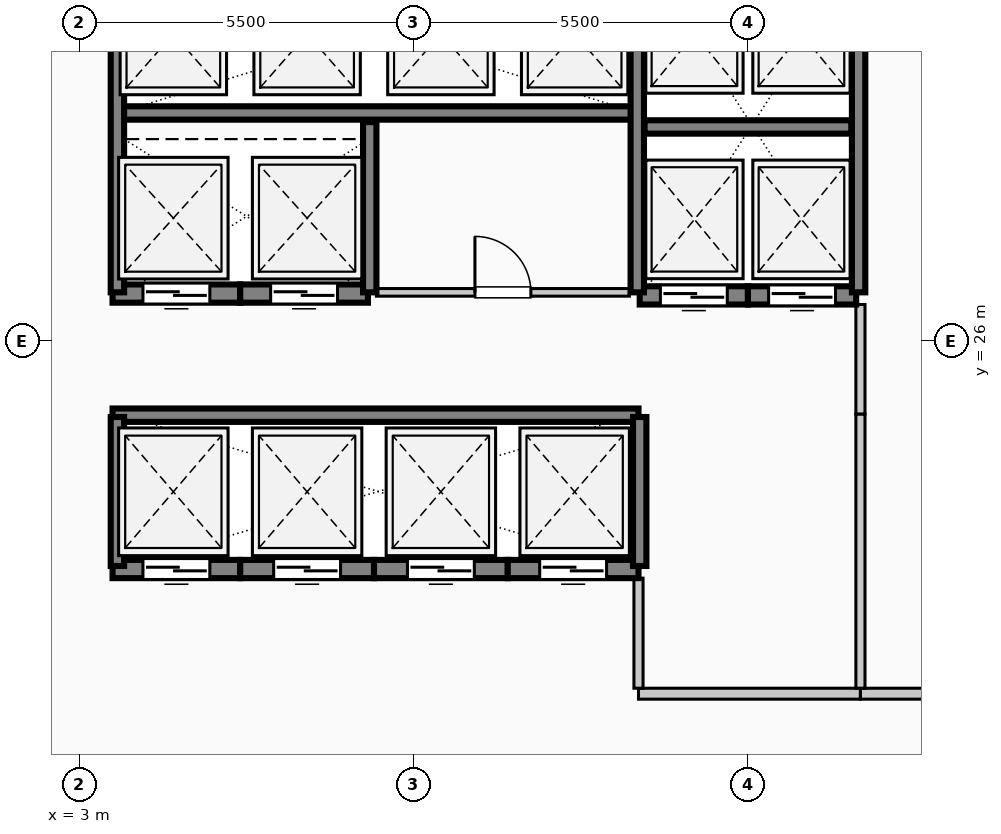
"""IFC4 building model, lengths in metres.
Left out: names, types, materials, properties, quantities, classifications, styles, units other than length and angle.
Written with IfcOpenShell. Run it as: python <this file> out.ifc"""

import sys

from ifc_helpers import new_model, si_unit, direction, frame, frame_2d, origin, place, context, subcontext, project, spatial, rectangle, extrude, element, fill, save


model = new_model("IFC4")
c1 = context("Model", 3, precision=1e-05, world=origin(), true_north=direction((0.0, 1.0)))
c2 = subcontext(c1, "Body", "Model", "MODEL_VIEW")
j1 = project(units=[si_unit("LENGTHUNIT", "METRE"), si_unit("PLANEANGLEUNIT", "RADIAN")], contexts=[c1])
p1 = place(None, origin())
s1 = spatial("IfcSite", under=j1, at=p1, CompositionType="ELEMENT")
p2 = place(p1, origin())
s2 = spatial("IfcBuilding", under=s1, at=p2, CompositionType="ELEMENT")
p3 = place(p2, origin())
s3 = spatial("IfcBuildingStorey", under=s2, at=p3, CompositionType="ELEMENT", Elevation=0.0)
p4 = place(p3, frame((5.65, 22.25, 0.0), z_axis=(0.0, 0.0, 1.0), x_axis=(-1.0, 0.0, 0.0)))
e1 = element("IfcWall", 1, at=p4, inside=s3, PredefinedType="SOLIDWALL", context=c2, shape_type="SweptSolid", body=[
    extrude(rectangle(XDim=2.1, YDim=0.3, at=frame_2d((1.05, 0.0))), origin(), (0.0, 0.0, 1.0), 5.4),
])
p5 = place(p4, frame((0.5, 0.0, 0.0)))
e2 = element("IfcOpeningElement", 2, at=p5, cuts=e1, PredefinedType="OPENING", context=c2, shape_type="SweptSolid", body=[
    extrude(rectangle(XDim=1.1, YDim=2.2, at=frame_2d((0.55, 1.1))), frame((0.0, 0.16, 0.0), z_axis=(0.0, -1.0, 0.0), x_axis=(1.0, 0.0, 0.0)), (0.0, 0.0, 1.0), 0.32),
])
p6 = place(p3, frame((7.85, 22.25, 0.0), z_axis=(0.0, 0.0, 1.0), x_axis=(-1.0, 0.0, 0.0)))
e3 = element("IfcWall", 3, at=p6, inside=s3, PredefinedType="SOLIDWALL", context=c2, shape_type="SweptSolid", body=[
    extrude(rectangle(XDim=2.2, YDim=0.3, at=frame_2d((1.1, 0.0))), origin(), (0.0, 0.0, 1.0), 5.4),
])
p7 = place(p6, frame((0.55, 0.0, 0.0)))
e4 = element("IfcOpeningElement", 4, at=p7, cuts=e3, PredefinedType="OPENING", context=c2, shape_type="SweptSolid", body=[
    extrude(rectangle(XDim=1.1, YDim=2.2, at=frame_2d((0.55, 1.1))), frame((0.0, 0.16, 0.0), z_axis=(0.0, -1.0, 0.0), x_axis=(1.0, 0.0, 0.0)), (0.0, 0.0, 1.0), 0.32),
])
p8 = place(p3, frame((10.05, 22.25, 0.0), z_axis=(0.0, 0.0, 1.0), x_axis=(-1.0, 0.0, 0.0)))
e5 = element("IfcWall", 5, at=p8, inside=s3, PredefinedType="SOLIDWALL", context=c2, shape_type="SweptSolid", body=[
    extrude(rectangle(XDim=2.2, YDim=0.3, at=frame_2d((1.1, 0.0))), origin(), (0.0, 0.0, 1.0), 5.4),
])
p9 = place(p8, frame((0.55, 0.0, 0.0)))
e6 = element("IfcOpeningElement", 6, at=p9, cuts=e5, PredefinedType="OPENING", context=c2, shape_type="SweptSolid", body=[
    extrude(rectangle(XDim=1.1, YDim=2.2, at=frame_2d((0.55, 1.1))), frame((0.0, 0.16, 0.0), z_axis=(0.0, -1.0, 0.0), x_axis=(1.0, 0.0, 0.0)), (0.0, 0.0, 1.0), 0.32),
])
p10 = place(p3, frame((12.2, 22.25, 0.0), z_axis=(0.0, 0.0, 1.0), x_axis=(-1.0, 0.0, 0.0)))
e7 = element("IfcWall", 7, at=p10, inside=s3, PredefinedType="SOLIDWALL", context=c2, shape_type="SweptSolid", body=[
    extrude(rectangle(XDim=2.15, YDim=0.3, at=frame_2d((1.075, 0.0))), origin(), (0.0, 0.0, 1.0), 5.4),
])
p11 = place(p10, frame((0.525, 0.0, 0.0)))
e8 = element("IfcOpeningElement", 8, at=p11, cuts=e7, PredefinedType="OPENING", context=c2, shape_type="SweptSolid", body=[
    extrude(rectangle(XDim=1.1, YDim=2.2, at=frame_2d((0.55, 1.1))), frame((0.0, 0.16, 0.0), z_axis=(0.0, -1.0, 0.0), x_axis=(1.0, 0.0, 0.0)), (0.0, 0.0, 1.0), 0.32),
])
p12 = place(p3, frame((14.0, 26.75, 0.0), z_axis=(0.0, 0.0, 1.0), x_axis=(-1.0, 0.0, 0.0)))
e9 = element("IfcWall", 9, at=p12, inside=s3, PredefinedType="SOLIDWALL", context=c2, shape_type="SweptSolid", body=[
    extrude(rectangle(XDim=1.78, YDim=0.3, at=frame_2d((0.89, 0.0))), origin(), (0.0, 0.0, 1.0), 5.4),
])
p13 = place(p12, frame((0.34, 0.0, 0.0)))
e10 = element("IfcOpeningElement", 10, at=p13, cuts=e9, PredefinedType="OPENING", context=c2, shape_type="SweptSolid", body=[
    extrude(rectangle(XDim=1.1, YDim=2.2, at=frame_2d((0.55, 1.1))), frame((0.0, 0.16, 0.0), z_axis=(0.0, -1.0, 0.0), x_axis=(1.0, 0.0, 0.0)), (0.0, 0.0, 1.0), 0.32),
])
p14 = place(p3, frame((15.78, 26.75, 0.0), z_axis=(0.0, 0.0, 1.0), x_axis=(-1.0, 0.0, 0.0)))
e11 = element("IfcWall", 11, at=p14, inside=s3, PredefinedType="SOLIDWALL", context=c2, shape_type="SweptSolid", body=[
    extrude(rectangle(XDim=1.78, YDim=0.3, at=frame_2d((0.89, 0.0))), origin(), (0.0, 0.0, 1.0), 5.4),
])
p15 = place(p14, frame((0.34, 0.0, 0.0)))
e12 = element("IfcOpeningElement", 12, at=p15, cuts=e11, PredefinedType="OPENING", context=c2, shape_type="SweptSolid", body=[
    extrude(rectangle(XDim=1.1, YDim=2.2, at=frame_2d((0.55, 1.1))), frame((0.0, 0.16, 0.0), z_axis=(0.0, -1.0, 0.0), x_axis=(1.0, 0.0, 0.0)), (0.0, 0.0, 1.0), 0.32),
])
p16 = place(p3, frame((5.65, 26.78, 0.0), z_axis=(0.0, 0.0, 1.0), x_axis=(-1.0, 0.0, 0.0)))
e13 = element("IfcWall", 13, at=p16, inside=s3, PredefinedType="SOLIDWALL", context=c2, shape_type="SweptSolid", body=[
    extrude(rectangle(XDim=2.1, YDim=0.3, at=frame_2d((1.05, 0.0))), origin(), (0.0, 0.0, 1.0), 5.4),
])
p17 = place(p16, frame((0.5, 0.0, 0.0)))
e14 = element("IfcOpeningElement", 14, at=p17, cuts=e13, PredefinedType="OPENING", context=c2, shape_type="SweptSolid", body=[
    extrude(rectangle(XDim=1.1, YDim=2.2, at=frame_2d((0.55, 1.1))), frame((0.0, 0.16, 0.0), z_axis=(0.0, -1.0, 0.0), x_axis=(1.0, 0.0, 0.0)), (0.0, 0.0, 1.0), 0.32),
])
p18 = place(p3, frame((7.75, 26.78, 0.0), z_axis=(0.0, 0.0, 1.0), x_axis=(-1.0, 0.0, 0.0)))
e15 = element("IfcWall", 15, at=p18, inside=s3, PredefinedType="SOLIDWALL", context=c2, shape_type="SweptSolid", body=[
    extrude(rectangle(XDim=2.1, YDim=0.3, at=frame_2d((1.05, 0.0))), origin(), (0.0, 0.0, 1.0), 5.4),
])
p19 = place(p18, frame((0.5, 0.0, 0.0)))
e16 = element("IfcOpeningElement", 16, at=p19, cuts=e15, PredefinedType="OPENING", context=c2, shape_type="SweptSolid", body=[
    extrude(rectangle(XDim=1.1, YDim=2.2, at=frame_2d((0.55, 1.1))), frame((0.0, 0.16, 0.0), z_axis=(0.0, -1.0, 0.0), x_axis=(1.0, 0.0, 0.0)), (0.0, 0.0, 1.0), 0.32),
])
p20 = place(p3, frame((3.55, 29.75, 0.0), z_axis=(0.0, 0.0, 1.0), x_axis=(1.0, 0.0, 0.0)))
e17 = element("IfcWall", 17, at=p20, inside=s3, PredefinedType="SOLIDWALL", context=c2, shape_type="SweptSolid", body=[
    extrude(rectangle(XDim=8.65, YDim=0.22, at=frame_2d((4.325, 0.0))), origin(), (0.0, 0.0, 1.0), 5.4),
])
p21 = place(p3, frame((3.63, 26.8, 0.0), z_axis=(0.0, 0.0, 1.0), x_axis=(0.0, 1.0, 0.0)))
e18 = element("IfcWall", 18, at=p21, inside=s3, PredefinedType="SOLIDWALL", context=c2, shape_type="SweptSolid", body=[
    extrude(rectangle(XDim=5.55, YDim=0.22, at=frame_2d((2.775, 0.0))), origin(), (0.0, 0.0, 1.0), 5.4),
])
p22 = place(p3, frame((7.78, 26.8, 0.0), z_axis=(0.0, 0.0, 1.0), x_axis=(0.0, 1.0, 0.0)))
e19 = element("IfcWall", 19, at=p22, inside=s3, PredefinedType="SOLIDWALL", context=c2, shape_type="SweptSolid", body=[
    extrude(rectangle(XDim=2.8, YDim=0.22, at=frame_2d((1.4, 0.0))), origin(), (0.0, 0.0, 1.0), 5.4),
])
for number, where, z_axis, x_axis in (
    (20, (12.18, 26.8, 0.0), (0.0, 0.0, 1.0), (0.0, 1.0, 0.0)),
    (21, (15.82, 26.8, 0.0), (0.0, 0.0, 1.0), (0.0, 1.0, 0.0)),
):
    element("IfcWall", number, at=place(p3, frame(where, z_axis=z_axis, x_axis=x_axis)), inside=s3, PredefinedType="SOLIDWALL", context=c2, shape_type="SweptSolid", body=[
        extrude(rectangle(XDim=5.45, YDim=0.22, at=frame_2d((2.725, 0.0))), origin(), (0.0, 0.0, 1.0), 5.4),
    ])
p23 = place(p3, frame((12.3, 29.52, 0.0), z_axis=(0.0, 0.0, 1.0), x_axis=(1.0, 0.0, 0.0)))
e22 = element("IfcWall", 22, at=p23, inside=s3, PredefinedType="SOLIDWALL", context=c2, shape_type="SweptSolid", body=[
    extrude(rectangle(XDim=3.4, YDim=0.22, at=frame_2d((1.7, 0.0))), origin(), (0.0, 0.0, 1.0), 5.4),
])
p24 = place(p3, frame((3.55, 24.78, 0.0), z_axis=(0.0, 0.0, 1.0), x_axis=(1.0, 0.0, 0.0)))
e23 = element("IfcWall", 23, at=p24, inside=s3, PredefinedType="SOLIDWALL", context=c2, shape_type="SweptSolid", body=[
    extrude(rectangle(XDim=8.65, YDim=0.22, at=frame_2d((4.325, 0.0))), origin(), (0.0, 0.0, 1.0), 5.4),
])
for number, where, z_axis, x_axis in (
    (24, (3.63, 22.3, 0.0), (0.0, 0.0, 1.0), (0.0, 1.0, 0.0)),
    (25, (12.22, 22.3, 0.0), (0.0, 0.0, 1.0), (0.0, 1.0, 0.0)),
):
    element("IfcWall", number, at=place(p3, frame(where, z_axis=z_axis, x_axis=x_axis)), inside=s3, PredefinedType="SOLIDWALL", context=c2, shape_type="SweptSolid", body=[
        extrude(rectangle(XDim=2.45, YDim=0.22, at=frame_2d((1.225, 0.0))), origin(), (0.0, 0.0, 1.0), 5.4),
    ])
p25 = place(p3, frame((12.2, 20.2, 0.0), z_axis=(0.0, 0.0, 1.0), x_axis=(1.0, 0.0, 0.0)))
e26 = element("IfcWall", 26, at=p25, inside=s3, PredefinedType="PARTITIONING", context=c2, shape_type="SweptSolid", body=[
    extrude(rectangle(XDim=3.65, YDim=0.18, at=frame_2d((1.825, 0.0))), origin(), (0.0, 0.0, 1.0), 5.0),
])
p26 = place(p3, frame((15.85, 20.2, 0.0), z_axis=(0.0, 0.0, 1.0), x_axis=(1.0, 0.0, 0.0)))
e27 = element("IfcWall", 27, at=p26, inside=s3, PredefinedType="PARTITIONING", context=c2, shape_type="SweptSolid", body=[
    extrude(rectangle(XDim=25.7, YDim=0.18, at=frame_2d((12.85, 0.0))), origin(), (0.0, 0.0, 1.0), 5.0),
])
p27 = place(p26, frame((11.115, 0.0, 0.0)))
e28 = element("IfcOpeningElement", 28, at=p27, cuts=e27, PredefinedType="OPENING", context=c2, shape_type="SweptSolid", body=[
    extrude(rectangle(XDim=0.95, YDim=2.15, at=frame_2d((0.475, 1.075))), frame((0.0, 0.1, 0.0), z_axis=(0.0, -1.0, 0.0), x_axis=(1.0, 0.0, 0.0)), (0.0, 0.0, 1.0), 0.2),
])
p28 = place(p3, frame((7.89, 26.8, 0.0), z_axis=(0.0, 0.0, 1.0), x_axis=(1.0, 0.0, 0.0)))
e29 = element("IfcWall", 29, at=p28, inside=s3, PredefinedType="PARTITIONING", context=c2, shape_type="SweptSolid", body=[
    extrude(rectangle(XDim=4.16, YDim=0.125, at=frame_2d((2.08, 0.0))), origin(), (0.0, 0.0, 1.0), 5.0),
])
p29 = place(p28, frame((1.62, 0.0, 0.0)))
e30 = element("IfcOpeningElement", 30, at=p29, cuts=e29, PredefinedType="OPENING", context=c2, shape_type="SweptSolid", body=[
    extrude(rectangle(XDim=0.92, YDim=2.1, at=frame_2d((0.46, 1.05))), frame((0.0, 0.073, 0.0), z_axis=(0.0, -1.0, 0.0), x_axis=(1.0, 0.0, 0.0)), (0.0, 0.0, 1.0), 0.145),
])
p30 = place(p3, frame((12.2, 20.29, 0.0), z_axis=(0.0, 0.0, 1.0), x_axis=(0.0, 1.0, 0.0)))
e31 = element("IfcWall", 31, at=p30, inside=s3, PredefinedType="PARTITIONING", context=c2, shape_type="SweptSolid", body=[
    extrude(rectangle(XDim=1.81, YDim=0.15, at=frame_2d((0.905, 0.0))), origin(), (0.0, 0.0, 1.0), 5.0),
])
p31 = place(p3, frame((15.85, 20.29, 0.0), z_axis=(0.0, 0.0, 1.0), x_axis=(0.0, 1.0, 0.0)))
e32 = element("IfcWall", 32, at=p31, inside=s3, PredefinedType="PARTITIONING", context=c2, shape_type="SweptSolid", body=[
    extrude(rectangle(XDim=4.51, YDim=0.15, at=frame_2d((2.255, 0.0))), origin(), (0.0, 0.0, 1.0), 5.0),
])
p32 = place(p3, frame((15.85, 24.8, 0.0), z_axis=(0.0, 0.0, 1.0), x_axis=(0.0, 1.0, 0.0)))
e33 = element("IfcWall", 33, at=p32, inside=s3, PredefinedType="PARTITIONING", context=c2, shape_type="SweptSolid", body=[
    extrude(rectangle(XDim=1.8, YDim=0.15, at=frame_2d((0.9, 0.0))), origin(), (0.0, 0.0, 1.0), 5.0),
])
p33 = place(p5, origin())
e34 = element("IfcDoor", 34, at=p33, inside=s3, OperationType="SLIDING_TO_LEFT", PredefinedType="DOOR", context=c2, shape_type="SweptSolid", body=[
    extrude(rectangle(XDim=1.1, YDim=2.2, at=frame_2d((0.55, 1.1))), frame((0.0, 0.025, 0.0), z_axis=(0.0, -1.0, 0.0), x_axis=(1.0, 0.0, 0.0)), (0.0, 0.0, 1.0), 0.05),
])
fill(e2, e34)
p34 = place(p7, origin())
e35 = element("IfcDoor", 35, at=p34, inside=s3, OperationType="SLIDING_TO_RIGHT", PredefinedType="DOOR", context=c2, shape_type="SweptSolid", body=[
    extrude(rectangle(XDim=1.1, YDim=2.2, at=frame_2d((0.55, 1.1))), frame((0.0, 0.025, 0.0), z_axis=(0.0, -1.0, 0.0), x_axis=(1.0, 0.0, 0.0)), (0.0, 0.0, 1.0), 0.05),
])
fill(e4, e35)
p35 = place(p9, origin())
e36 = element("IfcDoor", 36, at=p35, inside=s3, OperationType="SLIDING_TO_LEFT", PredefinedType="DOOR", context=c2, shape_type="SweptSolid", body=[
    extrude(rectangle(XDim=1.1, YDim=2.2, at=frame_2d((0.55, 1.1))), frame((0.0, 0.025, 0.0), z_axis=(0.0, -1.0, 0.0), x_axis=(1.0, 0.0, 0.0)), (0.0, 0.0, 1.0), 0.05),
])
fill(e6, e36)
p36 = place(p11, origin())
e37 = element("IfcDoor", 37, at=p36, inside=s3, OperationType="SLIDING_TO_RIGHT", PredefinedType="DOOR", context=c2, shape_type="SweptSolid", body=[
    extrude(rectangle(XDim=1.1, YDim=2.2, at=frame_2d((0.55, 1.1))), frame((0.0, 0.025, 0.0), z_axis=(0.0, -1.0, 0.0), x_axis=(1.0, 0.0, 0.0)), (0.0, 0.0, 1.0), 0.05),
])
fill(e8, e37)
p37 = place(p13, origin())
e38 = element("IfcDoor", 38, at=p37, inside=s3, OperationType="SLIDING_TO_LEFT", PredefinedType="DOOR", context=c2, shape_type="SweptSolid", body=[
    extrude(rectangle(XDim=1.1, YDim=2.2, at=frame_2d((0.55, 1.1))), frame((0.0, 0.025, 0.0), z_axis=(0.0, -1.0, 0.0), x_axis=(1.0, 0.0, 0.0)), (0.0, 0.0, 1.0), 0.05),
])
fill(e10, e38)
p38 = place(p15, origin())
e39 = element("IfcDoor", 39, at=p38, inside=s3, OperationType="SLIDING_TO_RIGHT", PredefinedType="DOOR", context=c2, shape_type="SweptSolid", body=[
    extrude(rectangle(XDim=1.1, YDim=2.2, at=frame_2d((0.55, 1.1))), frame((0.0, 0.025, 0.0), z_axis=(0.0, -1.0, 0.0), x_axis=(1.0, 0.0, 0.0)), (0.0, 0.0, 1.0), 0.05),
])
fill(e12, e39)
p39 = place(p17, origin())
e40 = element("IfcDoor", 40, at=p39, inside=s3, OperationType="SLIDING_TO_LEFT", PredefinedType="DOOR", context=c2, shape_type="SweptSolid", body=[
    extrude(rectangle(XDim=1.1, YDim=2.2, at=frame_2d((0.55, 1.1))), frame((0.0, 0.025, 0.0), z_axis=(0.0, -1.0, 0.0), x_axis=(1.0, 0.0, 0.0)), (0.0, 0.0, 1.0), 0.05),
])
fill(e14, e40)
p40 = place(p19, origin())
e41 = element("IfcDoor", 41, at=p40, inside=s3, OperationType="SLIDING_TO_RIGHT", PredefinedType="DOOR", context=c2, shape_type="SweptSolid", body=[
    extrude(rectangle(XDim=1.1, YDim=2.2, at=frame_2d((0.55, 1.1))), frame((0.0, 0.025, 0.0), z_axis=(0.0, -1.0, 0.0), x_axis=(1.0, 0.0, 0.0)), (0.0, 0.0, 1.0), 0.05),
])
fill(e16, e41)
p41 = place(p29, origin())
e42 = element("IfcDoor", 42, at=p41, inside=s3, OperationType="SINGLE_SWING_LEFT", PredefinedType="DOOR", context=c2, shape_type="SweptSolid", body=[
    extrude(rectangle(XDim=0.92, YDim=2.1, at=frame_2d((0.46, 1.05))), frame((0.0, 0.025, 0.0), z_axis=(0.0, -1.0, 0.0), x_axis=(1.0, 0.0, 0.0)), (0.0, 0.0, 1.0), 0.05),
])
fill(e30, e42)
save(model, sys.argv[1])
